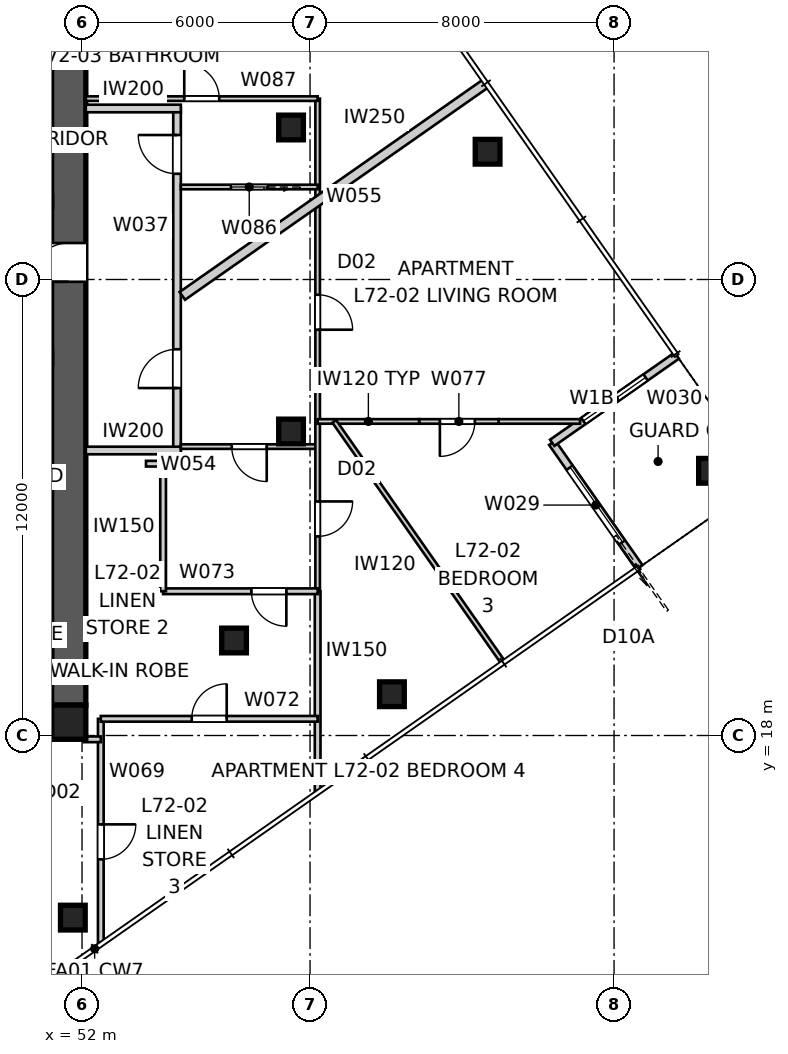
"""IFC4 building model, lengths in metres.
Left out: names, types, materials, properties, quantities, classifications, styles, units other than length and angle.
Written with IfcOpenShell. Run it as: python <this file> out.ifc"""

import sys

from ifc_helpers import new_model, si_unit, direction, frame, frame_2d, origin, origin_2d, place, context, subcontext, project, spatial, polyline, rectangle, outline, extrude, element, fill, save


model = new_model("IFC4")
c1 = context("Model", 3, precision=1e-05, world=origin(), true_north=direction((0.0, 1.0)))
c2 = subcontext(c1, "Body", "Model", "MODEL_VIEW")
j1 = project(units=[si_unit("LENGTHUNIT", "METRE"), si_unit("PLANEANGLEUNIT", "RADIAN")], contexts=[c1])
p1 = place(None, origin())
s1 = spatial("IfcSite", under=j1, at=p1, CompositionType="ELEMENT")
p2 = place(p1, origin())
s2 = spatial("IfcBuilding", under=s1, at=p2, CompositionType="ELEMENT")
p3 = place(p2, frame((0.0, 0.0, 260.8)))
s3 = spatial("IfcBuildingStorey", under=s2, at=p3, CompositionType="ELEMENT", Elevation=260.8)
p4 = place(p3, frame((51.2, 18.35, 0.0), z_axis=(0.0, 0.0, 1.0), x_axis=(-1.0, 0.0, 0.0)))
e1 = element("IfcWall", 1, at=p4, inside=s3, PredefinedType="SHEAR", context=c2, shape_type="SweptSolid", body=[
    extrude(outline(polyline([(0.0, -0.45), (22.4, -0.45), (22.4, -0.025), (22.85, -0.025), (22.85, 0.025), (22.4, 0.025), (22.4, 0.45), (0.0, 0.45), (0.0, 0.025), (-0.45, 0.025), (-0.45, -0.025), (0.0, -0.025), (0.0, -0.45)])), origin(), (0.0, 0.0, 1.0), 3.4),
])
p5 = place(p3, frame((51.65, 18.8, 0.0), z_axis=(0.0, 0.0, 1.0), x_axis=(0.0, 1.0, 0.0)))
e2 = element("IfcWall", 2, at=p5, inside=s3, PredefinedType="SHEAR", context=c2, shape_type="SweptSolid", body=[
    extrude(outline(polyline([(0.0, -0.45), (22.4, -0.45), (22.4, -0.025), (22.85, -0.025), (22.85, 0.025), (22.4, 0.025), (22.4, 0.45), (0.0, 0.45), (0.0, 0.025), (-0.45, 0.025), (-0.45, -0.025), (0.0, -0.025), (0.0, -0.45)])), origin(), (0.0, 0.0, 1.0), 3.4),
])
p6 = place(p5, frame((11.14, 0.0, 0.0)))
e3 = element("IfcOpeningElement", 3, at=p6, cuts=e2, PredefinedType="OPENING", context=c2, shape_type="SweptSolid", body=[
    extrude(rectangle(XDim=1.02, YDim=2.4, at=frame_2d((0.51, 1.2))), frame((0.0, 0.46, 0.0), z_axis=(0.0, -1.0, 0.0), x_axis=(1.0, 0.0, 0.0)), (0.0, 0.0, 1.0), 0.92),
])
p7 = place(p3, frame((51.65, 18.35, 0.0), z_axis=(0.0, 0.0, 1.0), x_axis=(1.0, 0.0, 0.0)))
e4 = element("IfcColumn", 4, at=p7, inside=s3, PredefinedType="COLUMN", context=c2, shape_type="SweptSolid", body=[
    extrude(rectangle(XDim=0.9, YDim=0.9, at=origin_2d()), origin(), (0.0, 0.0, 1.0), 3.4),
])
for number, where, z_axis, x_axis in (
    (5, (51.758, 13.207, 0.0), (0.0, 0.0, 1.0), (1.0, 0.0, 0.0)),
    (6, (60.155, 19.086, 0.0), (0.0, 0.0, 1.0), (1.0, 0.0, 0.0)),
    (7, (68.551, 24.966, 0.0), (0.0, 0.0, 1.0), (1.0, 0.0, 0.0)),
    (8, (62.672, 33.362, 0.0), (0.0, 0.0, 1.0), (1.0, 0.0, 0.0)),
    (9, (57.5, 26.0, 0.0), (0.0, 0.0, 1.0), (1.0, 0.0, 0.0)),
    (10, (57.5, 34.0, 0.0), (0.0, 0.0, 1.0), (1.0, 0.0, 0.0)),
    (11, (56.0, 20.5, 0.0), (0.0, 0.0, 1.0), (1.0, 0.0, 0.0)),
):
    element("IfcColumn", number, at=place(p3, frame(where, z_axis=z_axis, x_axis=x_axis)), inside=s3, PredefinedType="COLUMN", context=c2, shape_type="SweptSolid", body=[
        extrude(rectangle(XDim=0.65, YDim=0.65, at=origin_2d()), origin(), (0.0, 0.0, 1.0), 3.4),
    ])
p8 = place(p3, frame((66.667, 22.426, 0.0), z_axis=(0.0, 0.0, 1.0), x_axis=(-0.573556557423, 0.819165963305, 0.0)))
e12 = element("IfcWall", 12, at=p8, inside=s3, PredefinedType="SOLIDWALL", context=c2, shape_type="SweptSolid", body=[
    extrude(rectangle(XDim=4.0, YDim=0.2, at=frame_2d((2.0, 0.0))), origin(), (0.0, 0.0, 1.0), 3.25),
])
p9 = place(p8, frame((0.8, 0.0, 0.0)))
e13 = element("IfcOpeningElement", 13, at=p9, cuts=e12, PredefinedType="OPENING", context=c2, shape_type="SweptSolid", body=[
    extrude(rectangle(XDim=2.4, YDim=2.1, at=frame_2d((1.2, 1.05))), frame((0.0, 0.11, 0.0), z_axis=(0.0, -1.0, 0.0), x_axis=(1.0, 0.0, 0.0)), (0.0, 0.0, 1.0), 0.22),
])
p10 = place(p3, frame((64.373, 25.702, 0.0), z_axis=(0.0, 0.0, 1.0), x_axis=(0.819137286189, 0.573597512525, 0.0)))
e14 = element("IfcWall", 14, at=p10, inside=s3, PredefinedType="SOLIDWALL", context=c2, shape_type="SweptSolid", body=[
    extrude(rectangle(XDim=4.0, YDim=0.2, at=frame_2d((2.0, 0.0))), origin(), (0.0, 0.0, 1.0), 3.25),
])
p11 = place(p10, frame((1.0, 0.0, 0.45)))
e15 = element("IfcOpeningElement", 15, at=p11, cuts=e14, PredefinedType="OPENING", context=c2, shape_type="SweptSolid", body=[
    extrude(rectangle(XDim=2.0, YDim=1.8, at=frame_2d((1.0, 0.9))), frame((0.0, 0.11, 0.0), z_axis=(0.0, -1.0, 0.0), x_axis=(1.0, 0.0, 0.0)), (0.0, 0.0, 1.0), 0.22),
])
p12 = place(p3, frame((54.5, 25.5, 0.0), z_axis=(0.0, 0.0, 1.0), x_axis=(0.0, 1.0, 0.0)))
e16 = element("IfcWall", 16, at=p12, inside=s3, PredefinedType="PARTITIONING", context=c2, shape_type="SweptSolid", body=[
    extrude(rectangle(XDim=9.0, YDim=0.2, at=frame_2d((4.5, 0.0))), origin(), (0.0, 0.0, 1.0), 3.25),
])
p13 = place(p12, frame((1.643, 0.0, 0.0)))
e17 = element("IfcOpeningElement", 17, at=p13, cuts=e16, PredefinedType="OPENING", context=c2, shape_type="SweptSolid", body=[
    extrude(rectangle(XDim=1.02, YDim=2.34, at=frame_2d((0.51, 1.17))), frame((0.0, 0.11, 0.0), z_axis=(0.0, -1.0, 0.0), x_axis=(1.0, 0.0, 0.0)), (0.0, 0.0, 1.0), 0.22),
])
p14 = place(p12, frame((7.282, 0.0, 0.0)))
e18 = element("IfcOpeningElement", 18, at=p14, cuts=e16, PredefinedType="OPENING", context=c2, shape_type="SweptSolid", body=[
    extrude(rectangle(XDim=1.02, YDim=2.34, at=frame_2d((0.51, 1.17))), frame((0.0, 0.11, 0.0), z_axis=(0.0, -1.0, 0.0), x_axis=(1.0, 0.0, 0.0)), (0.0, 0.0, 1.0), 0.22),
])
for number, where, z_axis, x_axis in (
    (19, (52.1, 34.5, 0.0), (0.0, 0.0, 1.0), (1.0, 0.0, 0.0)),
    (20, (52.1, 25.5, 0.0), (0.0, 0.0, 1.0), (1.0, 0.0, 0.0)),
):
    element("IfcWall", number, at=place(p3, frame(where, z_axis=z_axis, x_axis=x_axis)), inside=s3, PredefinedType="PARTITIONING", context=c2, shape_type="SweptSolid", body=[
        extrude(rectangle(XDim=2.5, YDim=0.2, at=frame_2d((1.25, 0.0))), origin(), (0.0, 0.0, 1.0), 3.25),
    ])
p15 = place(p3, frame((62.631, 35.164, 0.0), z_axis=(0.0, 0.0, 1.0), x_axis=(-0.81915902312, -0.573566469418, 0.0)))
e21 = element("IfcWall", 21, at=p15, inside=s3, PredefinedType="PARTITIONING", context=c2, shape_type="SweptSolid", body=[
    extrude(rectangle(XDim=9.756, YDim=0.25, at=frame_2d((4.878, 0.0))), origin(), (0.0, 0.0, 1.0), 3.25),
])
p16 = place(p3, frame((58.2, 25.603, 0.0), z_axis=(0.0, 0.0, 1.0), x_axis=(-1.0, 0.0, 0.0)))
e22 = element("IfcWall", 22, at=p16, inside=s3, PredefinedType="PARTITIONING", context=c2, shape_type="SweptSolid", body=[
    extrude(rectangle(XDim=3.6, YDim=0.12, at=frame_2d((1.8, 0.0))), origin(), (0.0, 0.0, 1.0), 3.25),
])
p17 = place(p16, frame((1.34, 0.0, 0.0)))
e23 = element("IfcOpeningElement", 23, at=p17, cuts=e22, PredefinedType="OPENING", context=c2, shape_type="SweptSolid", body=[
    extrude(rectangle(XDim=0.92, YDim=2.34, at=frame_2d((0.46, 1.17))), frame((0.0, 0.07, 0.0), z_axis=(0.0, -1.0, 0.0), x_axis=(1.0, 0.0, 0.0)), (0.0, 0.0, 1.0), 0.14),
])
p18 = place(p3, frame((58.2, 34.76, 0.0), z_axis=(0.0, 0.0, 1.0), x_axis=(0.0, -1.0, 0.0)))
e24 = element("IfcWall", 24, at=p18, inside=s3, PredefinedType="PARTITIONING", context=c2, shape_type="SweptSolid", body=[
    extrude(rectangle(XDim=12.964, YDim=0.12, at=frame_2d((6.482, 0.0))), origin(), (0.0, 0.0, 1.0), 3.25),
])
p19 = place(p18, frame((5.162, 0.0, 0.0)))
e25 = element("IfcOpeningElement", 25, at=p19, cuts=e24, PredefinedType="OPENING", context=c2, shape_type="SweptSolid", body=[
    extrude(rectangle(XDim=0.92, YDim=2.34, at=frame_2d((0.46, 1.17))), frame((0.0, 0.07, 0.0), z_axis=(0.0, -1.0, 0.0), x_axis=(1.0, 0.0, 0.0)), (0.0, 0.0, 1.0), 0.14),
])
p20 = place(p18, frame((10.6, 0.0, 0.0)))
e26 = element("IfcOpeningElement", 26, at=p20, cuts=e24, PredefinedType="OPENING", context=c2, shape_type="SweptSolid", body=[
    extrude(rectangle(XDim=0.92, YDim=2.34, at=frame_2d((0.46, 1.17))), frame((0.0, 0.07, 0.0), z_axis=(0.0, -1.0, 0.0), x_axis=(1.0, 0.0, 0.0)), (0.0, 0.0, 1.0), 0.14),
])
p21 = place(p3, frame((51.422, 11.8, 0.0), z_axis=(0.0, 0.0, 1.0), x_axis=(-1.0, 0.0, 0.0)))
e27 = element("IfcWall", 27, at=p21, inside=s3, PredefinedType="PARTITIONING", context=c2, shape_type="SweptSolid", body=[
    extrude(rectangle(XDim=6.213, YDim=0.12, at=frame_2d((3.106, 0.0))), origin(), (0.0, 0.0, 1.0), 3.25),
])
p22 = place(p21, frame((1.061, 0.0, 0.0)))
e28 = element("IfcOpeningElement", 28, at=p22, cuts=e27, PredefinedType="OPENING", context=c2, shape_type="SweptSolid", body=[
    extrude(rectangle(XDim=0.92, YDim=2.1, at=frame_2d((0.46, 1.05))), frame((0.0, 0.07, 0.0), z_axis=(0.0, -1.0, 0.0), x_axis=(1.0, 0.0, 0.0)), (0.0, 0.0, 1.0), 0.14),
])
p23 = place(p3, frame((52.494, 18.439, 0.0), z_axis=(0.0, 0.0, 1.0), x_axis=(0.0, -1.0, 0.0)))
e29 = element("IfcWall", 29, at=p23, inside=s3, PredefinedType="SOLIDWALL", context=c2, shape_type="SweptSolid", body=[
    extrude(rectangle(XDim=5.888, YDim=0.15, at=frame_2d((2.944, 0.0))), origin(), (0.0, 0.0, 1.0), 3.25),
])
p24 = place(p23, frame((2.778, 0.0, 0.0)))
e30 = element("IfcOpeningElement", 30, at=p24, cuts=e29, PredefinedType="OPENING", context=c2, shape_type="SweptSolid", body=[
    extrude(rectangle(XDim=0.92, YDim=2.34, at=frame_2d((0.46, 1.17))), frame((0.0, 0.085, 0.0), z_axis=(0.0, -1.0, 0.0), x_axis=(1.0, 0.0, 0.0)), (0.0, 0.0, 1.0), 0.17),
])
p25 = place(p3, frame((52.05, 17.9, 0.0), z_axis=(0.0, 0.0, 1.0), x_axis=(1.0, 0.0, 0.0)))
e31 = element("IfcWall", 31, at=p25, inside=s3, PredefinedType="SOLIDWALL", context=c2, shape_type="SweptSolid", body=[
    extrude(rectangle(XDim=0.444, YDim=0.15, at=frame_2d((0.222, 0.0))), origin(), (0.0, 0.0, 1.0), 3.25),
])
p26 = place(p3, frame((58.2, 21.796, 0.0), z_axis=(0.0, 0.0, 1.0), x_axis=(0.0, -1.0, 0.0)))
e32 = element("IfcWall", 32, at=p26, inside=s3, PredefinedType="SOLIDWALL", context=c2, shape_type="SweptSolid", body=[
    extrude(rectangle(XDim=5.25, YDim=0.15, at=frame_2d((2.625, 0.0))), origin(), (0.0, 0.0, 1.0), 3.25),
])
p27 = place(p3, frame((52.494, 18.439, 0.0), z_axis=(0.0, 0.0, 1.0), x_axis=(1.0, 0.0, 0.0)))
e33 = element("IfcWall", 33, at=p27, inside=s3, PredefinedType="SOLIDWALL", context=c2, shape_type="SweptSolid", body=[
    extrude(rectangle(XDim=5.706, YDim=0.15, at=frame_2d((2.853, 0.0))), origin(), (0.0, 0.0, 1.0), 3.25),
])
p28 = place(p27, frame((2.393, 0.0, 0.0)))
e34 = element("IfcOpeningElement", 34, at=p28, cuts=e33, PredefinedType="OPENING", context=c2, shape_type="SweptSolid", body=[
    extrude(rectangle(XDim=0.92, YDim=2.34, at=frame_2d((0.46, 1.17))), frame((0.0, 0.085, 0.0), z_axis=(0.0, -1.0, 0.0), x_axis=(1.0, 0.0, 0.0)), (0.0, 0.0, 1.0), 0.17),
])
p29 = place(p3, frame((58.2, 21.796, 0.0), z_axis=(0.0, 0.0, 1.0), x_axis=(-1.0, 0.0, 0.0)))
e35 = element("IfcWall", 35, at=p29, inside=s3, PredefinedType="SOLIDWALL", context=c2, shape_type="SweptSolid", body=[
    extrude(rectangle(XDim=4.067, YDim=0.15, at=frame_2d((2.033, 0.0))), origin(), (0.0, 0.0, 1.0), 3.25),
])
p30 = place(p29, frame((0.823, 0.0, 0.0)))
e36 = element("IfcOpeningElement", 36, at=p30, cuts=e35, PredefinedType="OPENING", context=c2, shape_type="SweptSolid", body=[
    extrude(rectangle(XDim=0.92, YDim=2.34, at=frame_2d((0.46, 1.17))), frame((0.0, 0.085, 0.0), z_axis=(0.0, -1.0, 0.0), x_axis=(1.0, 0.0, 0.0)), (0.0, 0.0, 1.0), 0.17),
])
p31 = place(p3, frame((54.133, 21.796, 0.0), z_axis=(0.0, 0.0, 1.0), x_axis=(0.0, 1.0, 0.0)))
e37 = element("IfcWall", 37, at=p31, inside=s3, PredefinedType="SOLIDWALL", context=c2, shape_type="SweptSolid", body=[
    extrude(rectangle(XDim=3.357, YDim=0.15, at=frame_2d((1.678, 0.0))), origin(), (0.0, 0.0, 1.0), 3.25),
])
p32 = place(p3, frame((54.133, 25.153, 0.0), z_axis=(0.0, 0.0, 1.0), x_axis=(-1.0, 0.0, 0.0)))
e38 = element("IfcWall", 38, at=p32, inside=s3, PredefinedType="SOLIDWALL", context=c2, shape_type="SweptSolid", body=[
    extrude(rectangle(XDim=0.45, YDim=0.15, at=frame_2d((0.225, 0.0))), origin(), (0.0, 0.0, 1.0), 3.25),
])
p33 = place(p3, frame((65.106, 26.265, 0.0), z_axis=(0.0, 0.0, 1.0), x_axis=(-1.0, 0.0, 0.0)))
e39 = element("IfcWall", 39, at=p33, inside=s3, PredefinedType="PARTITIONING", context=c2, shape_type="SweptSolid", body=[
    extrude(rectangle(XDim=2.144, YDim=0.12, at=frame_2d((1.072, 0.0))), origin(), (0.0, 0.0, 1.0), 3.25),
])
p34 = place(p3, frame((62.962, 26.265, 0.0), z_axis=(0.0, 0.0, 1.0), x_axis=(-1.0, 0.0, 0.0)))
e40 = element("IfcWall", 40, at=p34, inside=s3, PredefinedType="PARTITIONING", context=c2, shape_type="SweptSolid", body=[
    extrude(rectangle(XDim=2.092, YDim=0.12, at=frame_2d((1.046, 0.0))), origin(), (0.0, 0.0, 1.0), 2.35),
])
p35 = place(p34, frame((0.625, 0.0, 0.0)))
e41 = element("IfcOpeningElement", 41, at=p35, cuts=e40, PredefinedType="OPENING", context=c2, shape_type="SweptSolid", body=[
    extrude(rectangle(XDim=0.92, YDim=2.34, at=frame_2d((0.46, 1.17))), frame((0.0, 0.07, 0.0), z_axis=(0.0, -1.0, 0.0), x_axis=(1.0, 0.0, 0.0)), (0.0, 0.0, 1.0), 0.14),
])
p36 = place(p3, frame((60.87, 26.265, 0.0), z_axis=(0.0, 0.0, 1.0), x_axis=(-1.0, 0.0, 0.0)))
e42 = element("IfcWall", 42, at=p36, inside=s3, PredefinedType="PARTITIONING", context=c2, shape_type="SweptSolid", body=[
    extrude(rectangle(XDim=2.67, YDim=0.12, at=frame_2d((1.335, 0.0))), origin(), (0.0, 0.0, 1.0), 3.25),
])
p37 = place(p3, frame((63.06, 19.949, 0.0), z_axis=(0.0, 0.0, 1.0), x_axis=(-0.573562225439, 0.819161994693, 0.0)))
e43 = element("IfcWall", 43, at=p37, inside=s3, PredefinedType="PARTITIONING", context=c2, shape_type="SweptSolid", body=[
    extrude(rectangle(XDim=7.71, YDim=0.12, at=frame_2d((3.855, 0.0))), origin(), (0.0, 0.0, 1.0), 3.25),
])
p38 = place(p3, frame((58.2, 32.434, 0.0), z_axis=(0.0, 0.0, 1.0), x_axis=(-1.0, 0.0, 0.0)))
e44 = element("IfcWall", 44, at=p38, inside=s3, PredefinedType="PARTITIONING", context=c2, shape_type="SweptSolid", body=[
    extrude(rectangle(XDim=3.6, YDim=0.12, at=frame_2d((1.8, 0.0))), origin(), (0.0, 0.0, 1.0), 3.25),
])
p39 = place(p38, frame((1.32, 0.0, 0.0)))
e45 = element("IfcOpeningElement", 45, at=p39, cuts=e44, PredefinedType="OPENING", context=c2, shape_type="SweptSolid", body=[
    extrude(rectangle(XDim=0.96, YDim=2.1, at=frame_2d((0.48, 1.05))), frame((0.0, 0.07, 0.0), z_axis=(0.0, -1.0, 0.0), x_axis=(1.0, 0.0, 0.0)), (0.0, 0.0, 1.0), 0.14),
])
p40 = place(p3, frame((52.1, 34.76, 0.0), z_axis=(0.0, 0.0, 1.0), x_axis=(1.0, 0.0, 0.0)))
e46 = element("IfcWall", 46, at=p40, inside=s3, PredefinedType="PARTITIONING", context=c2, shape_type="SweptSolid", body=[
    extrude(rectangle(XDim=6.1, YDim=0.12, at=frame_2d((3.05, 0.0))), origin(), (0.0, 0.0, 1.0), 3.25),
])
p41 = place(p40, frame((2.59, 0.0, 0.0)))
e47 = element("IfcOpeningElement", 47, at=p41, cuts=e46, PredefinedType="OPENING", context=c2, shape_type="SweptSolid", body=[
    extrude(rectangle(XDim=0.92, YDim=2.34, at=frame_2d((0.46, 1.17))), frame((0.0, 0.07, 0.0), z_axis=(0.0, -1.0, 0.0), x_axis=(1.0, 0.0, 0.0)), (0.0, 0.0, 1.0), 0.14),
])
p42 = place(p9, origin())
e48 = element("IfcDoor", 48, at=p42, inside=s3, OperationType="SLIDING_TO_LEFT", PredefinedType="DOOR", context=c2, shape_type="SweptSolid", body=[
    extrude(rectangle(XDim=2.4, YDim=2.1, at=frame_2d((1.2, 1.05))), frame((0.0, 0.025, 0.0), z_axis=(0.0, -1.0, 0.0), x_axis=(1.0, 0.0, 0.0)), (0.0, 0.0, 1.0), 0.05),
])
fill(e13, e48)
p43 = place(p11, origin())
e49 = element("IfcWindow", 49, at=p43, inside=s3, PartitioningType="SINGLE_PANEL", PredefinedType="WINDOW", context=c2, shape_type="SweptSolid", body=[
    extrude(rectangle(XDim=2.0, YDim=1.8, at=frame_2d((1.0, 0.9))), frame((0.0, 0.03, 0.0), z_axis=(0.0, -1.0, 0.0), x_axis=(1.0, 0.0, 0.0)), (0.0, 0.0, 1.0), 0.06),
])
fill(e15, e49)
p44 = place(p13, origin())
e50 = element("IfcDoor", 50, at=p44, inside=s3, OperationType="SINGLE_SWING_LEFT", PredefinedType="DOOR", context=c2, shape_type="SweptSolid", body=[
    extrude(rectangle(XDim=1.02, YDim=2.34, at=frame_2d((0.51, 1.17))), frame((0.0, 0.025, 0.0), z_axis=(0.0, -1.0, 0.0), x_axis=(1.0, 0.0, 0.0)), (0.0, 0.0, 1.0), 0.05),
])
fill(e17, e50)
p45 = place(p14, origin())
e51 = element("IfcDoor", 51, at=p45, inside=s3, OperationType="SINGLE_SWING_RIGHT", PredefinedType="DOOR", context=c2, shape_type="SweptSolid", body=[
    extrude(rectangle(XDim=1.02, YDim=2.34, at=frame_2d((0.51, 1.17))), frame((0.0, 0.025, 0.0), z_axis=(0.0, -1.0, 0.0), x_axis=(1.0, 0.0, 0.0)), (0.0, 0.0, 1.0), 0.05),
])
fill(e18, e51)
p46 = place(p19, origin())
e52 = element("IfcDoor", 52, at=p46, inside=s3, OperationType="SINGLE_SWING_RIGHT", PredefinedType="DOOR", context=c2, shape_type="SweptSolid", body=[
    extrude(rectangle(XDim=0.92, YDim=2.34, at=frame_2d((0.46, 1.17))), frame((0.0, 0.025, 0.0), z_axis=(0.0, -1.0, 0.0), x_axis=(1.0, 0.0, 0.0)), (0.0, 0.0, 1.0), 0.05),
])
fill(e25, e52)
p47 = place(p17, origin())
e53 = element("IfcDoor", 53, at=p47, inside=s3, OperationType="SINGLE_SWING_LEFT", PredefinedType="DOOR", context=c2, shape_type="SweptSolid", body=[
    extrude(rectangle(XDim=0.92, YDim=2.34, at=frame_2d((0.46, 1.17))), frame((0.0, 0.025, 0.0), z_axis=(0.0, -1.0, 0.0), x_axis=(1.0, 0.0, 0.0)), (0.0, 0.0, 1.0), 0.05),
])
fill(e23, e53)
p48 = place(p41, origin())
e54 = element("IfcDoor", 54, at=p48, inside=s3, OperationType="SINGLE_SWING_LEFT", PredefinedType="DOOR", context=c2, shape_type="SweptSolid", body=[
    extrude(rectangle(XDim=0.92, YDim=2.34, at=frame_2d((0.46, 1.17))), frame((0.0, 0.025, 0.0), z_axis=(0.0, -1.0, 0.0), x_axis=(1.0, 0.0, 0.0)), (0.0, 0.0, 1.0), 0.05),
])
fill(e47, e54)
p49 = place(p39, origin())
e55 = element("IfcDoor", 55, at=p49, inside=s3, OperationType="SLIDING_TO_LEFT", PredefinedType="DOOR", context=c2, shape_type="SweptSolid", body=[
    extrude(rectangle(XDim=0.96, YDim=2.1, at=frame_2d((0.48, 1.05))), frame((0.0, 0.025, 0.0), z_axis=(0.0, -1.0, 0.0), x_axis=(1.0, 0.0, 0.0)), (0.0, 0.0, 1.0), 0.05),
])
fill(e45, e55)
p50 = place(p35, origin())
e56 = element("IfcDoor", 56, at=p50, inside=s3, OperationType="SINGLE_SWING_RIGHT", PredefinedType="DOOR", context=c2, shape_type="SweptSolid", body=[
    extrude(rectangle(XDim=0.92, YDim=2.34, at=frame_2d((0.46, 1.17))), frame((0.0, 0.025, 0.0), z_axis=(0.0, -1.0, 0.0), x_axis=(1.0, 0.0, 0.0)), (0.0, 0.0, 1.0), 0.05),
])
fill(e41, e56)
p51 = place(p30, origin())
e57 = element("IfcDoor", 57, at=p51, inside=s3, OperationType="SINGLE_SWING_LEFT", PredefinedType="DOOR", context=c2, shape_type="SweptSolid", body=[
    extrude(rectangle(XDim=0.92, YDim=2.34, at=frame_2d((0.46, 1.17))), frame((0.0, 0.025, 0.0), z_axis=(0.0, -1.0, 0.0), x_axis=(1.0, 0.0, 0.0)), (0.0, 0.0, 1.0), 0.05),
])
fill(e36, e57)
p52 = place(p20, origin())
e58 = element("IfcDoor", 58, at=p52, inside=s3, OperationType="SINGLE_SWING_LEFT", PredefinedType="DOOR", context=c2, shape_type="SweptSolid", body=[
    extrude(rectangle(XDim=0.92, YDim=2.34, at=frame_2d((0.46, 1.17))), frame((0.0, 0.025, 0.0), z_axis=(0.0, -1.0, 0.0), x_axis=(1.0, 0.0, 0.0)), (0.0, 0.0, 1.0), 0.05),
])
fill(e26, e58)
p53 = place(p28, origin())
e59 = element("IfcDoor", 59, at=p53, inside=s3, OperationType="SINGLE_SWING_RIGHT", PredefinedType="DOOR", context=c2, shape_type="SweptSolid", body=[
    extrude(rectangle(XDim=0.92, YDim=2.34, at=frame_2d((0.46, 1.17))), frame((0.0, 0.025, 0.0), z_axis=(0.0, -1.0, 0.0), x_axis=(1.0, 0.0, 0.0)), (0.0, 0.0, 1.0), 0.05),
])
fill(e34, e59)
p54 = place(p24, origin())
e60 = element("IfcDoor", 60, at=p54, inside=s3, OperationType="SINGLE_SWING_LEFT", PredefinedType="DOOR", context=c2, shape_type="SweptSolid", body=[
    extrude(rectangle(XDim=0.92, YDim=2.34, at=frame_2d((0.46, 1.17))), frame((0.0, 0.025, 0.0), z_axis=(0.0, -1.0, 0.0), x_axis=(1.0, 0.0, 0.0)), (0.0, 0.0, 1.0), 0.05),
])
fill(e30, e60)
p55 = place(p6, origin())
e61 = element("IfcDoor", 61, at=p55, inside=s3, OperationType="SINGLE_SWING_LEFT", PredefinedType="DOOR", context=c2, shape_type="SweptSolid", body=[
    extrude(rectangle(XDim=1.02, YDim=2.4, at=frame_2d((0.51, 1.2))), frame((0.0, 0.025, 0.0), z_axis=(0.0, -1.0, 0.0), x_axis=(1.0, 0.0, 0.0)), (0.0, 0.0, 1.0), 0.05),
])
fill(e3, e61)
save(model, sys.argv[1])
